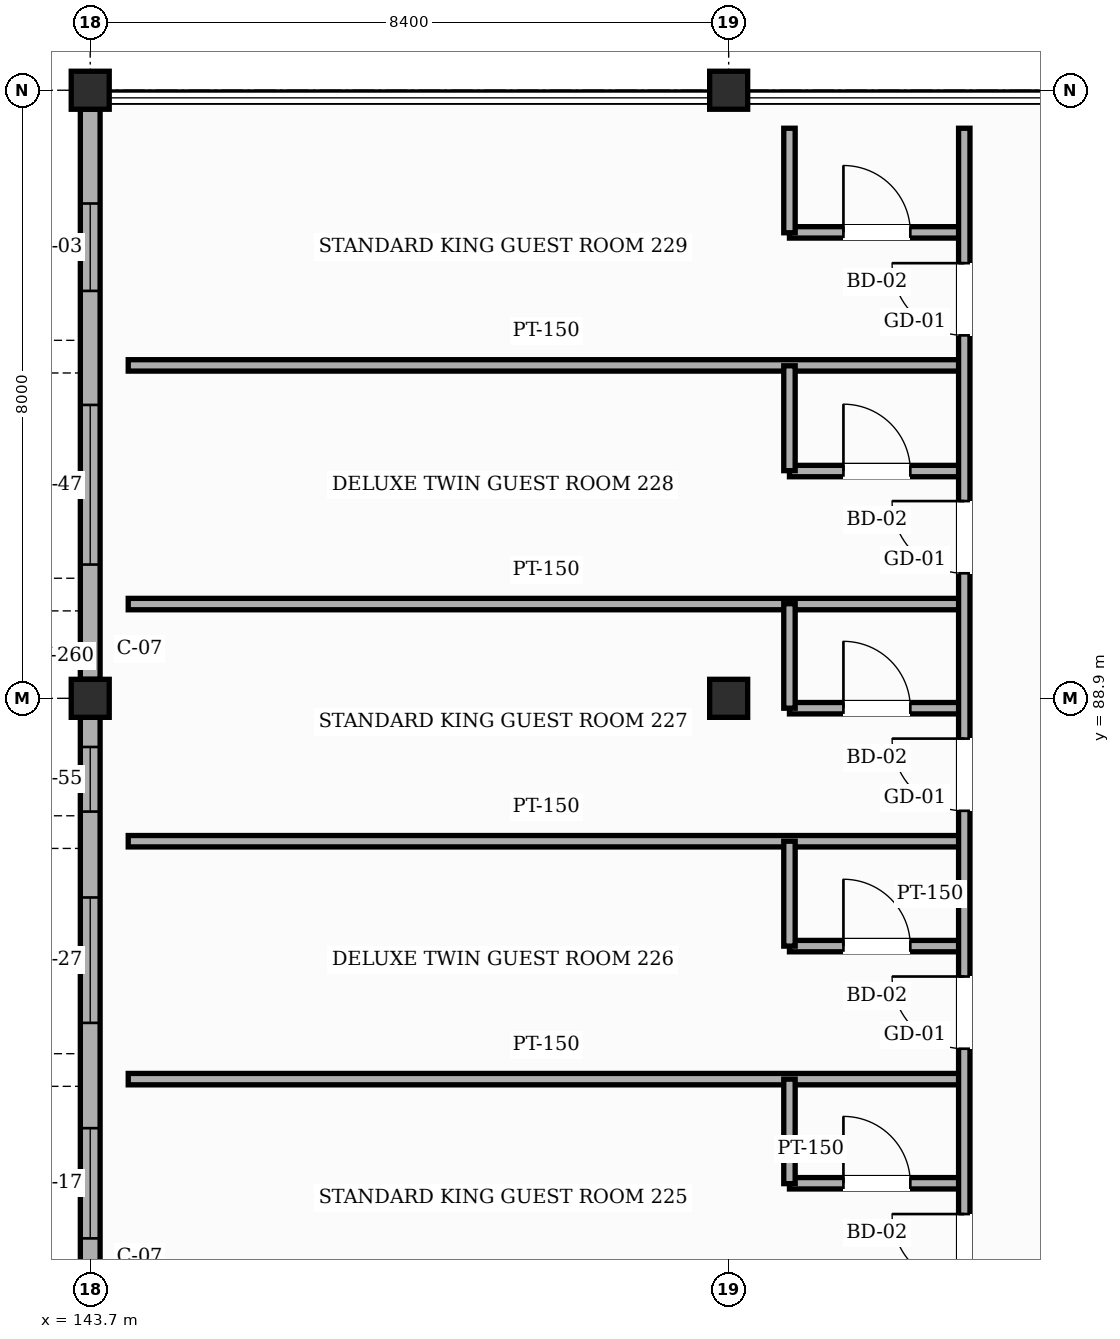
"""IFC4 building model, lengths in metres.
Left out: names, types, materials, properties, quantities, classifications, styles, units other than length and angle.
Written with IfcOpenShell. Run it as: python <this file> out.ifc"""

import sys

from ifc_helpers import new_model, si_unit, direction, frame, frame_2d, origin, origin_2d, place, context, subcontext, project, spatial, rectangle, hollow_rectangle, extrude, element, fill, save


model = new_model("IFC4")
c1 = context("Model", 3, precision=1e-05, world=origin(), true_north=direction((0.0, 1.0)))
c2 = subcontext(c1, "Body", "Model", "MODEL_VIEW")
j1 = project(units=[si_unit("LENGTHUNIT", "METRE"), si_unit("PLANEANGLEUNIT", "RADIAN")], contexts=[c1])
p1 = place(None, origin())
s1 = spatial("IfcSite", under=j1, at=p1, CompositionType="ELEMENT")
p2 = place(p1, origin())
s2 = spatial("IfcBuilding", under=s1, at=p2, CompositionType="ELEMENT")
p3 = place(p2, frame((0.0, 0.0, 35.4)))
s3 = spatial("IfcBuildingStorey", under=s2, at=p3, CompositionType="ELEMENT", Elevation=35.4)
for number, where, z_axis, x_axis in (
    (1, (143.7, 88.9, 0.0), (0.0, 0.0, 1.0), (1.0, 0.0, 0.0)),
    (2, (143.7, 96.9, 0.0), (0.0, 0.0, 1.0), (1.0, 0.0, 0.0)),
    (3, (152.1, 88.9, 0.0), (0.0, 0.0, 1.0), (1.0, 0.0, 0.0)),
    (4, (152.1, 96.9, 0.0), (0.0, 0.0, 1.0), (1.0, 0.0, 0.0)),
):
    element("IfcColumn", number, at=place(p3, frame(where, z_axis=z_axis, x_axis=x_axis)), inside=s3, PredefinedType="COLUMN", context=c2, shape_type="SweptSolid", body=[
        extrude(hollow_rectangle(XDim=0.5, YDim=0.5, WallThickness=0.022, InnerFilletRadius=0.022, OuterFilletRadius=0.044, at=origin_2d()), origin(), (0.0, 0.0, 1.0), 3.6),
    ])
p4 = place(p3, frame((143.7, 81.15, 0.0), z_axis=(0.0, 0.0, 1.0), x_axis=(0.0, 1.0, 0.0)))
e5 = element("IfcWall", 5, at=p4, inside=s3, PredefinedType="SOLIDWALL", context=c2, shape_type="SweptSolid", body=[
    extrude(rectangle(XDim=7.5, YDim=0.26, at=frame_2d((3.75, 0.0))), origin(), (0.0, 0.0, 1.0), 2.805),
])
p5 = place(p4, frame((0.645, 0.0, 0.85)))
e6 = element("IfcOpeningElement", 6, at=p5, cuts=e5, PredefinedType="OPENING", context=c2, shape_type="SweptSolid", body=[
    extrude(rectangle(XDim=1.45, YDim=1.5, at=frame_2d((0.725, 0.75))), frame((0.0, 0.14, 0.0), z_axis=(0.0, -1.0, 0.0), x_axis=(1.0, 0.0, 0.0)), (0.0, 0.0, 1.0), 0.28),
])
p6 = place(p4, frame((3.48, 0.0, 0.85)))
e7 = element("IfcOpeningElement", 7, at=p6, cuts=e5, PredefinedType="OPENING", context=c2, shape_type="SweptSolid", body=[
    extrude(rectangle(XDim=1.65, YDim=1.5, at=frame_2d((0.825, 0.75))), frame((0.0, 0.14, 0.0), z_axis=(0.0, -1.0, 0.0), x_axis=(1.0, 0.0, 0.0)), (0.0, 0.0, 1.0), 0.28),
])
p7 = place(p4, frame((6.26, 0.0, 0.85)))
e8 = element("IfcOpeningElement", 8, at=p7, cuts=e5, PredefinedType="OPENING", context=c2, shape_type="SweptSolid", body=[
    extrude(rectangle(XDim=0.85, YDim=1.35, at=frame_2d((0.425, 0.675))), frame((0.0, 0.14, 0.0), z_axis=(0.0, -1.0, 0.0), x_axis=(1.0, 0.0, 0.0)), (0.0, 0.0, 1.0), 0.28),
])
p8 = place(p3, frame((143.7, 89.15, 0.0), z_axis=(0.0, 0.0, 1.0), x_axis=(0.0, 1.0, 0.0)))
e9 = element("IfcWall", 9, at=p8, inside=s3, PredefinedType="SOLIDWALL", context=c2, shape_type="SweptSolid", body=[
    extrude(rectangle(XDim=7.5, YDim=0.26, at=frame_2d((3.75, 0.0))), origin(), (0.0, 0.0, 1.0), 2.805),
])
p9 = place(p8, frame((1.51, 0.0, 0.85)))
e10 = element("IfcOpeningElement", 10, at=p9, cuts=e9, PredefinedType="OPENING", context=c2, shape_type="SweptSolid", body=[
    extrude(rectangle(XDim=2.1, YDim=1.5, at=frame_2d((1.05, 0.75))), frame((0.0, 0.14, 0.0), z_axis=(0.0, -1.0, 0.0), x_axis=(1.0, 0.0, 0.0)), (0.0, 0.0, 1.0), 0.28),
])
p10 = place(p8, frame((5.11, 0.0, 0.85)))
e11 = element("IfcOpeningElement", 11, at=p10, cuts=e9, PredefinedType="OPENING", context=c2, shape_type="SweptSolid", body=[
    extrude(rectangle(XDim=1.15, YDim=1.65, at=frame_2d((0.575, 0.825))), frame((0.0, 0.14, 0.0), z_axis=(0.0, -1.0, 0.0), x_axis=(1.0, 0.0, 0.0)), (0.0, 0.0, 1.0), 0.28),
])
p11 = place(p3, frame((152.9, 82.52, 0.0), z_axis=(0.0, 0.0, 1.0), x_axis=(1.0, 0.0, 0.0)))
e12 = element("IfcWall", 12, at=p11, inside=s3, PredefinedType="PARTITIONING", context=c2, shape_type="SweptSolid", body=[
    extrude(rectangle(XDim=2.3, YDim=0.15, at=frame_2d((1.15, 0.0))), origin(), (0.0, 0.0, 1.0), 3.365),
])
p12 = place(p11, frame((0.71, 0.0, 0.0)))
e13 = element("IfcOpeningElement", 13, at=p12, cuts=e12, PredefinedType="OPENING", context=c2, shape_type="SweptSolid", body=[
    extrude(rectangle(XDim=0.88, YDim=2.12, at=frame_2d((0.44, 1.06))), frame((0.0, 0.085, 0.0), z_axis=(0.0, -1.0, 0.0), x_axis=(1.0, 0.0, 0.0)), (0.0, 0.0, 1.0), 0.17),
])
p13 = place(p3, frame((144.2, 83.89, 0.0), z_axis=(0.0, 0.0, 1.0), x_axis=(1.0, 0.0, 0.0)))
e14 = element("IfcWall", 14, at=p13, inside=s3, PredefinedType="PARTITIONING", context=c2, shape_type="SweptSolid", body=[
    extrude(rectangle(XDim=11.0, YDim=0.15, at=frame_2d((5.5, 0.0))), origin(), (0.0, 0.0, 1.0), 3.365),
])
p14 = place(p3, frame((152.9, 85.64, 0.0), z_axis=(0.0, 0.0, 1.0), x_axis=(1.0, 0.0, 0.0)))
e15 = element("IfcWall", 15, at=p14, inside=s3, PredefinedType="PARTITIONING", context=c2, shape_type="SweptSolid", body=[
    extrude(rectangle(XDim=2.3, YDim=0.15, at=frame_2d((1.15, 0.0))), origin(), (0.0, 0.0, 1.0), 3.365),
])
p15 = place(p14, frame((0.71, 0.0, 0.0)))
e16 = element("IfcOpeningElement", 16, at=p15, cuts=e15, PredefinedType="OPENING", context=c2, shape_type="SweptSolid", body=[
    extrude(rectangle(XDim=0.88, YDim=2.12, at=frame_2d((0.44, 1.06))), frame((0.0, 0.085, 0.0), z_axis=(0.0, -1.0, 0.0), x_axis=(1.0, 0.0, 0.0)), (0.0, 0.0, 1.0), 0.17),
])
p16 = place(p3, frame((144.2, 87.02, 0.0), z_axis=(0.0, 0.0, 1.0), x_axis=(1.0, 0.0, 0.0)))
e17 = element("IfcWall", 17, at=p16, inside=s3, PredefinedType="PARTITIONING", context=c2, shape_type="SweptSolid", body=[
    extrude(rectangle(XDim=11.0, YDim=0.15, at=frame_2d((5.5, 0.0))), origin(), (0.0, 0.0, 1.0), 3.365),
])
p17 = place(p3, frame((152.9, 88.77, 0.0), z_axis=(0.0, 0.0, 1.0), x_axis=(1.0, 0.0, 0.0)))
e18 = element("IfcWall", 18, at=p17, inside=s3, PredefinedType="PARTITIONING", context=c2, shape_type="SweptSolid", body=[
    extrude(rectangle(XDim=2.3, YDim=0.15, at=frame_2d((1.15, 0.0))), origin(), (0.0, 0.0, 1.0), 2.755),
])
p18 = place(p17, frame((0.71, 0.0, 0.0)))
e19 = element("IfcOpeningElement", 19, at=p18, cuts=e18, PredefinedType="OPENING", context=c2, shape_type="SweptSolid", body=[
    extrude(rectangle(XDim=0.88, YDim=2.12, at=frame_2d((0.44, 1.06))), frame((0.0, 0.085, 0.0), z_axis=(0.0, -1.0, 0.0), x_axis=(1.0, 0.0, 0.0)), (0.0, 0.0, 1.0), 0.17),
])
p19 = place(p3, frame((144.2, 90.14, 0.0), z_axis=(0.0, 0.0, 1.0), x_axis=(1.0, 0.0, 0.0)))
e20 = element("IfcWall", 20, at=p19, inside=s3, PredefinedType="PARTITIONING", context=c2, shape_type="SweptSolid", body=[
    extrude(rectangle(XDim=11.0, YDim=0.15, at=frame_2d((5.5, 0.0))), origin(), (0.0, 0.0, 1.0), 3.365),
])
p20 = place(p3, frame((152.9, 91.89, 0.0), z_axis=(0.0, 0.0, 1.0), x_axis=(1.0, 0.0, 0.0)))
e21 = element("IfcWall", 21, at=p20, inside=s3, PredefinedType="PARTITIONING", context=c2, shape_type="SweptSolid", body=[
    extrude(rectangle(XDim=2.3, YDim=0.15, at=frame_2d((1.15, 0.0))), origin(), (0.0, 0.0, 1.0), 3.365),
])
p21 = place(p20, frame((0.71, 0.0, 0.0)))
e22 = element("IfcOpeningElement", 22, at=p21, cuts=e21, PredefinedType="OPENING", context=c2, shape_type="SweptSolid", body=[
    extrude(rectangle(XDim=0.88, YDim=2.12, at=frame_2d((0.44, 1.06))), frame((0.0, 0.085, 0.0), z_axis=(0.0, -1.0, 0.0), x_axis=(1.0, 0.0, 0.0)), (0.0, 0.0, 1.0), 0.17),
])
p22 = place(p3, frame((144.2, 93.28, 0.0), z_axis=(0.0, 0.0, 1.0), x_axis=(1.0, 0.0, 0.0)))
e23 = element("IfcWall", 23, at=p22, inside=s3, PredefinedType="PARTITIONING", context=c2, shape_type="SweptSolid", body=[
    extrude(rectangle(XDim=11.0, YDim=0.15, at=frame_2d((5.5, 0.0))), origin(), (0.0, 0.0, 1.0), 3.365),
])
p23 = place(p3, frame((152.9, 95.03, 0.0), z_axis=(0.0, 0.0, 1.0), x_axis=(1.0, 0.0, 0.0)))
e24 = element("IfcWall", 24, at=p23, inside=s3, PredefinedType="PARTITIONING", context=c2, shape_type="SweptSolid", body=[
    extrude(rectangle(XDim=2.3, YDim=0.15, at=frame_2d((1.15, 0.0))), origin(), (0.0, 0.0, 1.0), 3.365),
])
p24 = place(p23, frame((0.71, 0.0, 0.0)))
e25 = element("IfcOpeningElement", 25, at=p24, cuts=e24, PredefinedType="OPENING", context=c2, shape_type="SweptSolid", body=[
    extrude(rectangle(XDim=0.88, YDim=2.12, at=frame_2d((0.44, 1.06))), frame((0.0, 0.085, 0.0), z_axis=(0.0, -1.0, 0.0), x_axis=(1.0, 0.0, 0.0)), (0.0, 0.0, 1.0), 0.17),
])
p25 = place(p3, frame((152.9, 82.515, 0.0), z_axis=(0.0, 0.0, 1.0), x_axis=(0.0, 1.0, 0.0)))
e26 = element("IfcWall", 26, at=p25, inside=s3, PredefinedType="PARTITIONING", context=c2, shape_type="SweptSolid", body=[
    extrude(rectangle(XDim=1.375, YDim=0.15, at=frame_2d((0.688, 0.0))), origin(), (0.0, 0.0, 1.0), 3.365),
])
p26 = place(p3, frame((152.9, 85.64, 0.0), z_axis=(0.0, 0.0, 1.0), x_axis=(0.0, 1.0, 0.0)))
e27 = element("IfcWall", 27, at=p26, inside=s3, PredefinedType="PARTITIONING", context=c2, shape_type="SweptSolid", body=[
    extrude(rectangle(XDim=1.38, YDim=0.15, at=frame_2d((0.69, 0.0))), origin(), (0.0, 0.0, 1.0), 3.365),
])
p27 = place(p3, frame((152.9, 88.77, 0.0), z_axis=(0.0, 0.0, 1.0), x_axis=(0.0, 1.0, 0.0)))
e28 = element("IfcWall", 28, at=p27, inside=s3, PredefinedType="PARTITIONING", context=c2, shape_type="SweptSolid", body=[
    extrude(rectangle(XDim=1.375, YDim=0.15, at=frame_2d((0.688, 0.0))), origin(), (0.0, 0.0, 1.0), 3.365),
])
p28 = place(p3, frame((152.9, 91.895, 0.0), z_axis=(0.0, 0.0, 1.0), x_axis=(0.0, 1.0, 0.0)))
e29 = element("IfcWall", 29, at=p28, inside=s3, PredefinedType="PARTITIONING", context=c2, shape_type="SweptSolid", body=[
    extrude(rectangle(XDim=1.38, YDim=0.15, at=frame_2d((0.69, 0.0))), origin(), (0.0, 0.0, 1.0), 3.365),
])
p29 = place(p3, frame((152.9, 95.025, 0.0), z_axis=(0.0, 0.0, 1.0), x_axis=(0.0, 1.0, 0.0)))
e30 = element("IfcWall", 30, at=p29, inside=s3, PredefinedType="PARTITIONING", context=c2, shape_type="SweptSolid", body=[
    extrude(rectangle(XDim=1.375, YDim=0.15, at=frame_2d((0.688, 0.0))), origin(), (0.0, 0.0, 1.0), 3.365),
])
p30 = place(p3, frame((155.2, 62.0, 0.0), z_axis=(0.0, 0.0, 1.0), x_axis=(0.0, 1.0, 0.0)))
e31 = element("IfcWall", 31, at=p30, inside=s3, PredefinedType="PARTITIONING", context=c2, shape_type="SweptSolid", body=[
    extrude(rectangle(XDim=34.4, YDim=0.15, at=frame_2d((17.2, 0.0))), origin(), (0.0, 0.0, 1.0), 3.365),
])
p31 = place(p30, frame((0.325, 0.0, 0.0)))
e32 = element("IfcOpeningElement", 32, at=p31, cuts=e31, PredefinedType="OPENING", context=c2, shape_type="SweptSolid", body=[
    extrude(rectangle(XDim=1.1, YDim=2.2, at=frame_2d((0.55, 1.1))), frame((0.0, 0.085, 0.0), z_axis=(0.0, -1.0, 0.0), x_axis=(1.0, 0.0, 0.0)), (0.0, 0.0, 1.0), 0.17),
])
p32 = place(p30, frame((3.525, 0.0, 0.0)))
e33 = element("IfcOpeningElement", 33, at=p32, cuts=e31, PredefinedType="OPENING", context=c2, shape_type="SweptSolid", body=[
    extrude(rectangle(XDim=0.95, YDim=2.15, at=frame_2d((0.475, 1.075))), frame((0.0, 0.085, 0.0), z_axis=(0.0, -1.0, 0.0), x_axis=(1.0, 0.0, 0.0)), (0.0, 0.0, 1.0), 0.17),
])
p33 = place(p30, frame((6.655, 0.0, 0.0)))
e34 = element("IfcOpeningElement", 34, at=p33, cuts=e31, PredefinedType="OPENING", context=c2, shape_type="SweptSolid", body=[
    extrude(rectangle(XDim=0.95, YDim=2.15, at=frame_2d((0.475, 1.075))), frame((0.0, 0.085, 0.0), z_axis=(0.0, -1.0, 0.0), x_axis=(1.0, 0.0, 0.0)), (0.0, 0.0, 1.0), 0.17),
])
p34 = place(p30, frame((9.78, 0.0, 0.0)))
e35 = element("IfcOpeningElement", 35, at=p34, cuts=e31, PredefinedType="OPENING", context=c2, shape_type="SweptSolid", body=[
    extrude(rectangle(XDim=0.95, YDim=2.15, at=frame_2d((0.475, 1.075))), frame((0.0, 0.085, 0.0), z_axis=(0.0, -1.0, 0.0), x_axis=(1.0, 0.0, 0.0)), (0.0, 0.0, 1.0), 0.17),
])
p35 = place(p30, frame((12.91, 0.0, 0.0)))
e36 = element("IfcOpeningElement", 36, at=p35, cuts=e31, PredefinedType="OPENING", context=c2, shape_type="SweptSolid", body=[
    extrude(rectangle(XDim=0.95, YDim=2.15, at=frame_2d((0.475, 1.075))), frame((0.0, 0.085, 0.0), z_axis=(0.0, -1.0, 0.0), x_axis=(1.0, 0.0, 0.0)), (0.0, 0.0, 1.0), 0.17),
])
p36 = place(p30, frame((16.035, 0.0, 0.0)))
e37 = element("IfcOpeningElement", 37, at=p36, cuts=e31, PredefinedType="OPENING", context=c2, shape_type="SweptSolid", body=[
    extrude(rectangle(XDim=0.95, YDim=2.15, at=frame_2d((0.475, 1.075))), frame((0.0, 0.085, 0.0), z_axis=(0.0, -1.0, 0.0), x_axis=(1.0, 0.0, 0.0)), (0.0, 0.0, 1.0), 0.17),
])
p37 = place(p30, frame((19.165, 0.0, 0.0)))
e38 = element("IfcOpeningElement", 38, at=p37, cuts=e31, PredefinedType="OPENING", context=c2, shape_type="SweptSolid", body=[
    extrude(rectangle(XDim=0.95, YDim=2.15, at=frame_2d((0.475, 1.075))), frame((0.0, 0.085, 0.0), z_axis=(0.0, -1.0, 0.0), x_axis=(1.0, 0.0, 0.0)), (0.0, 0.0, 1.0), 0.17),
])
p38 = place(p30, frame((22.29, 0.0, 0.0)))
e39 = element("IfcOpeningElement", 39, at=p38, cuts=e31, PredefinedType="OPENING", context=c2, shape_type="SweptSolid", body=[
    extrude(rectangle(XDim=0.95, YDim=2.15, at=frame_2d((0.475, 1.075))), frame((0.0, 0.085, 0.0), z_axis=(0.0, -1.0, 0.0), x_axis=(1.0, 0.0, 0.0)), (0.0, 0.0, 1.0), 0.17),
])
p39 = place(p30, frame((25.42, 0.0, 0.0)))
e40 = element("IfcOpeningElement", 40, at=p39, cuts=e31, PredefinedType="OPENING", context=c2, shape_type="SweptSolid", body=[
    extrude(rectangle(XDim=0.95, YDim=2.15, at=frame_2d((0.475, 1.075))), frame((0.0, 0.085, 0.0), z_axis=(0.0, -1.0, 0.0), x_axis=(1.0, 0.0, 0.0)), (0.0, 0.0, 1.0), 0.17),
])
p40 = place(p30, frame((28.545, 0.0, 0.0)))
e41 = element("IfcOpeningElement", 41, at=p40, cuts=e31, PredefinedType="OPENING", context=c2, shape_type="SweptSolid", body=[
    extrude(rectangle(XDim=0.95, YDim=2.15, at=frame_2d((0.475, 1.075))), frame((0.0, 0.085, 0.0), z_axis=(0.0, -1.0, 0.0), x_axis=(1.0, 0.0, 0.0)), (0.0, 0.0, 1.0), 0.17),
])
p41 = place(p30, frame((31.675, 0.0, 0.0)))
e42 = element("IfcOpeningElement", 42, at=p41, cuts=e31, PredefinedType="OPENING", context=c2, shape_type="SweptSolid", body=[
    extrude(rectangle(XDim=0.95, YDim=2.15, at=frame_2d((0.475, 1.075))), frame((0.0, 0.085, 0.0), z_axis=(0.0, -1.0, 0.0), x_axis=(1.0, 0.0, 0.0)), (0.0, 0.0, 1.0), 0.17),
])
p42 = place(p5, origin())
e43 = element("IfcWindow", 43, at=p42, inside=s3, PartitioningType="SINGLE_PANEL", PredefinedType="WINDOW", context=c2, shape_type="SweptSolid", body=[
    extrude(rectangle(XDim=1.45, YDim=1.5, at=frame_2d((0.725, 0.75))), frame((0.0, 0.03, 0.0), z_axis=(0.0, -1.0, 0.0), x_axis=(1.0, 0.0, 0.0)), (0.0, 0.0, 1.0), 0.06),
])
fill(e6, e43)
p43 = place(p6, origin())
e44 = element("IfcWindow", 44, at=p43, inside=s3, PartitioningType="SINGLE_PANEL", PredefinedType="WINDOW", context=c2, shape_type="SweptSolid", body=[
    extrude(rectangle(XDim=1.65, YDim=1.5, at=frame_2d((0.825, 0.75))), frame((0.0, 0.03, 0.0), z_axis=(0.0, -1.0, 0.0), x_axis=(1.0, 0.0, 0.0)), (0.0, 0.0, 1.0), 0.06),
])
fill(e7, e44)
p44 = place(p7, origin())
e45 = element("IfcWindow", 45, at=p44, inside=s3, PartitioningType="SINGLE_PANEL", PredefinedType="WINDOW", context=c2, shape_type="SweptSolid", body=[
    extrude(rectangle(XDim=0.85, YDim=1.35, at=frame_2d((0.425, 0.675))), frame((0.0, 0.03, 0.0), z_axis=(0.0, -1.0, 0.0), x_axis=(1.0, 0.0, 0.0)), (0.0, 0.0, 1.0), 0.06),
])
fill(e8, e45)
p45 = place(p9, origin())
e46 = element("IfcWindow", 46, at=p45, inside=s3, PartitioningType="SINGLE_PANEL", PredefinedType="WINDOW", context=c2, shape_type="SweptSolid", body=[
    extrude(rectangle(XDim=2.1, YDim=1.5, at=frame_2d((1.05, 0.75))), frame((0.0, 0.03, 0.0), z_axis=(0.0, -1.0, 0.0), x_axis=(1.0, 0.0, 0.0)), (0.0, 0.0, 1.0), 0.06),
])
fill(e10, e46)
p46 = place(p10, origin())
e47 = element("IfcWindow", 47, at=p46, inside=s3, PartitioningType="SINGLE_PANEL", PredefinedType="WINDOW", context=c2, shape_type="SweptSolid", body=[
    extrude(rectangle(XDim=1.15, YDim=1.65, at=frame_2d((0.575, 0.825))), frame((0.0, 0.03, 0.0), z_axis=(0.0, -1.0, 0.0), x_axis=(1.0, 0.0, 0.0)), (0.0, 0.0, 1.0), 0.06),
])
fill(e11, e47)
p47 = place(p37, origin())
e48 = element("IfcDoor", 48, at=p47, inside=s3, OperationType="SINGLE_SWING_RIGHT", PredefinedType="DOOR", context=c2, shape_type="SweptSolid", body=[
    extrude(rectangle(XDim=0.95, YDim=2.15, at=frame_2d((0.475, 1.075))), frame((0.0, 0.025, 0.0), z_axis=(0.0, -1.0, 0.0), x_axis=(1.0, 0.0, 0.0)), (0.0, 0.0, 1.0), 0.05),
])
fill(e38, e48)
p48 = place(p12, origin())
e49 = element("IfcDoor", 49, at=p48, inside=s3, OperationType="SINGLE_SWING_LEFT", PredefinedType="DOOR", context=c2, shape_type="SweptSolid", body=[
    extrude(rectangle(XDim=0.88, YDim=2.12, at=frame_2d((0.44, 1.06))), frame((0.0, 0.025, 0.0), z_axis=(0.0, -1.0, 0.0), x_axis=(1.0, 0.0, 0.0)), (0.0, 0.0, 1.0), 0.05),
])
fill(e13, e49)
p49 = place(p38, origin())
e50 = element("IfcDoor", 50, at=p49, inside=s3, OperationType="SINGLE_SWING_RIGHT", PredefinedType="DOOR", context=c2, shape_type="SweptSolid", body=[
    extrude(rectangle(XDim=0.95, YDim=2.15, at=frame_2d((0.475, 1.075))), frame((0.0, 0.025, 0.0), z_axis=(0.0, -1.0, 0.0), x_axis=(1.0, 0.0, 0.0)), (0.0, 0.0, 1.0), 0.05),
])
fill(e39, e50)
p50 = place(p15, origin())
e51 = element("IfcDoor", 51, at=p50, inside=s3, OperationType="SINGLE_SWING_LEFT", PredefinedType="DOOR", context=c2, shape_type="SweptSolid", body=[
    extrude(rectangle(XDim=0.88, YDim=2.12, at=frame_2d((0.44, 1.06))), frame((0.0, 0.025, 0.0), z_axis=(0.0, -1.0, 0.0), x_axis=(1.0, 0.0, 0.0)), (0.0, 0.0, 1.0), 0.05),
])
fill(e16, e51)
p51 = place(p39, origin())
e52 = element("IfcDoor", 52, at=p51, inside=s3, OperationType="SINGLE_SWING_RIGHT", PredefinedType="DOOR", context=c2, shape_type="SweptSolid", body=[
    extrude(rectangle(XDim=0.95, YDim=2.15, at=frame_2d((0.475, 1.075))), frame((0.0, 0.025, 0.0), z_axis=(0.0, -1.0, 0.0), x_axis=(1.0, 0.0, 0.0)), (0.0, 0.0, 1.0), 0.05),
])
fill(e40, e52)
p52 = place(p18, origin())
e53 = element("IfcDoor", 53, at=p52, inside=s3, OperationType="SINGLE_SWING_LEFT", PredefinedType="DOOR", context=c2, shape_type="SweptSolid", body=[
    extrude(rectangle(XDim=0.88, YDim=2.12, at=frame_2d((0.44, 1.06))), frame((0.0, 0.025, 0.0), z_axis=(0.0, -1.0, 0.0), x_axis=(1.0, 0.0, 0.0)), (0.0, 0.0, 1.0), 0.05),
])
fill(e19, e53)
p53 = place(p40, origin())
e54 = element("IfcDoor", 54, at=p53, inside=s3, OperationType="SINGLE_SWING_RIGHT", PredefinedType="DOOR", context=c2, shape_type="SweptSolid", body=[
    extrude(rectangle(XDim=0.95, YDim=2.15, at=frame_2d((0.475, 1.075))), frame((0.0, 0.025, 0.0), z_axis=(0.0, -1.0, 0.0), x_axis=(1.0, 0.0, 0.0)), (0.0, 0.0, 1.0), 0.05),
])
fill(e41, e54)
p54 = place(p21, origin())
e55 = element("IfcDoor", 55, at=p54, inside=s3, OperationType="SINGLE_SWING_LEFT", PredefinedType="DOOR", context=c2, shape_type="SweptSolid", body=[
    extrude(rectangle(XDim=0.88, YDim=2.12, at=frame_2d((0.44, 1.06))), frame((0.0, 0.025, 0.0), z_axis=(0.0, -1.0, 0.0), x_axis=(1.0, 0.0, 0.0)), (0.0, 0.0, 1.0), 0.05),
])
fill(e22, e55)
p55 = place(p41, origin())
e56 = element("IfcDoor", 56, at=p55, inside=s3, OperationType="SINGLE_SWING_RIGHT", PredefinedType="DOOR", context=c2, shape_type="SweptSolid", body=[
    extrude(rectangle(XDim=0.95, YDim=2.15, at=frame_2d((0.475, 1.075))), frame((0.0, 0.025, 0.0), z_axis=(0.0, -1.0, 0.0), x_axis=(1.0, 0.0, 0.0)), (0.0, 0.0, 1.0), 0.05),
])
fill(e42, e56)
p56 = place(p24, origin())
e57 = element("IfcDoor", 57, at=p56, inside=s3, OperationType="SINGLE_SWING_LEFT", PredefinedType="DOOR", context=c2, shape_type="SweptSolid", body=[
    extrude(rectangle(XDim=0.88, YDim=2.12, at=frame_2d((0.44, 1.06))), frame((0.0, 0.025, 0.0), z_axis=(0.0, -1.0, 0.0), x_axis=(1.0, 0.0, 0.0)), (0.0, 0.0, 1.0), 0.05),
])
fill(e25, e57)
save(model, sys.argv[1])
